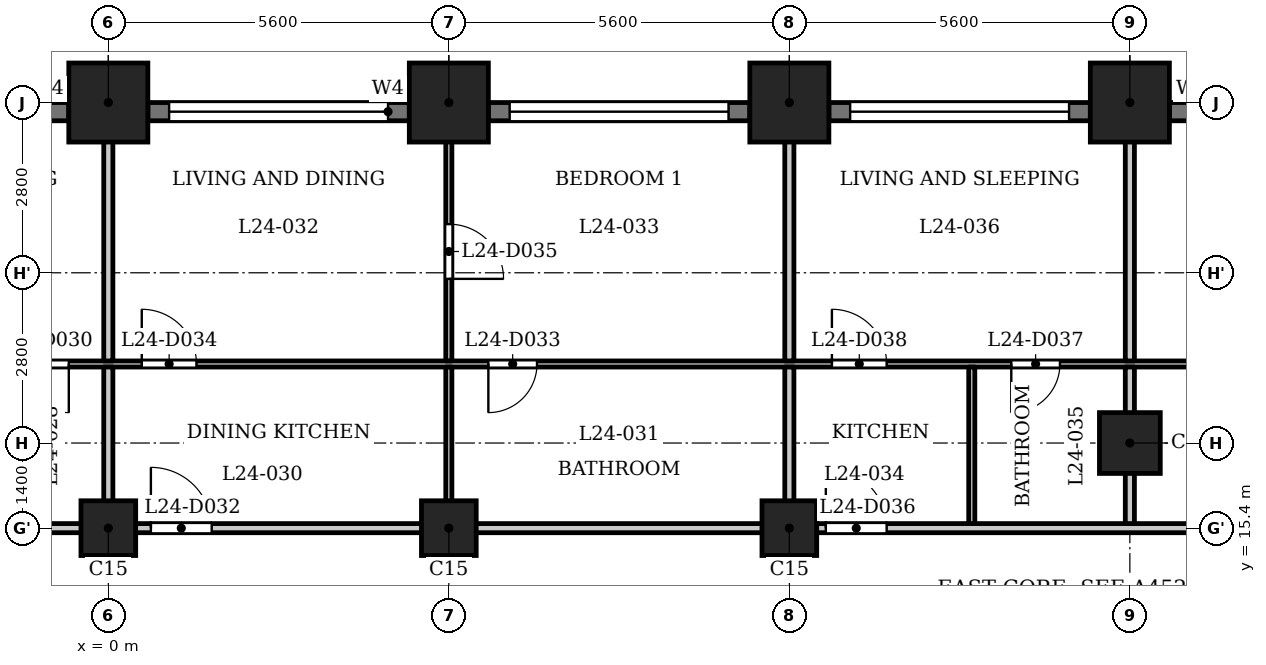
"""IFC4 building model, lengths in metres.
Left out: names, types, materials, properties, quantities, classifications, styles, units other than length and angle.
Written with IfcOpenShell. Run it as: python <this file> out.ifc"""

import sys

from ifc_helpers import new_model, si_unit, direction, frame, frame_2d, origin, origin_2d, place, context, subcontext, project, spatial, rectangle, extrude, element, fill, save


model = new_model("IFC4")
c1 = context("Model", 3, precision=1e-05, world=origin(), true_north=direction((0.0, 1.0)))
c2 = subcontext(c1, "Body", "Model", "MODEL_VIEW")
j1 = project(units=[si_unit("LENGTHUNIT", "METRE"), si_unit("PLANEANGLEUNIT", "RADIAN")], contexts=[c1])
p1 = place(None, origin())
s1 = spatial("IfcSite", under=j1, at=p1, CompositionType="ELEMENT")
p2 = place(p1, origin())
s2 = spatial("IfcBuilding", under=s1, at=p2, CompositionType="ELEMENT")
p3 = place(p2, frame((0.0, 0.0, 97.3)))
s3 = spatial("IfcBuildingStorey", under=s2, at=p3, CompositionType="ELEMENT", Elevation=97.3)
for number, where, z_axis, x_axis in (
    (1, (16.8, 22.4, 0.0), (0.0, 0.0, 1.0), (1.0, 0.0, 0.0)),
    (2, (11.2, 22.4, 0.0), (0.0, 0.0, 1.0), (1.0, 0.0, 0.0)),
    (3, (5.6, 22.4, 0.0), (0.0, 0.0, 1.0), (1.0, 0.0, 0.0)),
    (4, (0.0, 22.4, 0.0), (0.0, 0.0, 1.0), (1.0, 0.0, 0.0)),
):
    element("IfcColumn", number, at=place(p3, frame(where, z_axis=z_axis, x_axis=x_axis)), inside=s3, PredefinedType="COLUMN", context=c2, shape_type="SweptSolid", body=[
        extrude(rectangle(XDim=1.3, YDim=1.3, at=origin_2d()), origin(), (0.0, 0.0, 1.0), 3.5),
    ])
p4 = place(p3, frame((16.8, 16.8, 0.0), z_axis=(0.0, 0.0, 1.0), x_axis=(1.0, 0.0, 0.0)))
e5 = element("IfcColumn", 5, at=p4, inside=s3, PredefinedType="COLUMN", context=c2, shape_type="SweptSolid", body=[
    extrude(rectangle(XDim=1.0, YDim=1.0, at=origin_2d()), origin(), (0.0, 0.0, 1.0), 3.5),
])
for number, where, z_axis, x_axis in (
    (6, (0.0, 15.4, 0.0), (0.0, 0.0, 1.0), (1.0, 0.0, 0.0)),
    (7, (5.6, 15.4, 0.0), (0.0, 0.0, 1.0), (1.0, 0.0, 0.0)),
    (8, (11.2, 15.4, 0.0), (0.0, 0.0, 1.0), (1.0, 0.0, 0.0)),
):
    element("IfcColumn", number, at=place(p3, frame(where, z_axis=z_axis, x_axis=x_axis)), inside=s3, PredefinedType="COLUMN", context=c2, shape_type="SweptSolid", body=[
        extrude(rectangle(XDim=0.9, YDim=0.9, at=origin_2d()), origin(), (0.0, 0.0, 1.0), 3.5),
    ])
p5 = place(p3, frame((20.0, 22.25, 0.0), z_axis=(0.0, 0.0, 1.0), x_axis=(-1.0, 0.0, 0.0)))
e9 = element("IfcWall", 9, at=p5, inside=s3, PredefinedType="SOLIDWALL", context=c2, shape_type="SweptSolid", body=[
    extrude(rectangle(XDim=2.55, YDim=0.3, at=frame_2d((1.275, 0.0))), origin(), (0.0, 0.0, 1.0), 2.4),
])
p6 = place(p5, frame((0.375, 0.0, 0.9)))
e10 = element("IfcOpeningElement", 10, at=p6, cuts=e9, PredefinedType="OPENING", context=c2, shape_type="SweptSolid", body=[
    extrude(rectangle(XDim=1.8, YDim=1.25, at=frame_2d((0.9, 0.625))), frame((0.0, 0.16, 0.0), z_axis=(0.0, -1.0, 0.0), x_axis=(1.0, 0.0, 0.0)), (0.0, 0.0, 1.0), 0.32),
])
p7 = place(p3, frame((16.15, 22.25, 0.0), z_axis=(0.0, 0.0, 1.0), x_axis=(-1.0, 0.0, 0.0)))
e11 = element("IfcWall", 11, at=p7, inside=s3, PredefinedType="SOLIDWALL", context=c2, shape_type="SweptSolid", body=[
    extrude(rectangle(XDim=4.3, YDim=0.3, at=frame_2d((2.15, 0.0))), origin(), (0.0, 0.0, 1.0), 2.4),
])
p8 = place(p7, frame((0.35, 0.0, 1.2)))
e12 = element("IfcOpeningElement", 12, at=p8, cuts=e11, PredefinedType="OPENING", context=c2, shape_type="SweptSolid", body=[
    extrude(rectangle(XDim=3.6, YDim=0.95, at=frame_2d((1.8, 0.475))), frame((0.0, 0.16, 0.0), z_axis=(0.0, -1.0, 0.0), x_axis=(1.0, 0.0, 0.0)), (0.0, 0.0, 1.0), 0.32),
])
p9 = place(p3, frame((10.55, 22.25, 0.0), z_axis=(0.0, 0.0, 1.0), x_axis=(-1.0, 0.0, 0.0)))
e13 = element("IfcWall", 13, at=p9, inside=s3, PredefinedType="SOLIDWALL", context=c2, shape_type="SweptSolid", body=[
    extrude(rectangle(XDim=4.3, YDim=0.3, at=frame_2d((2.15, 0.0))), origin(), (0.0, 0.0, 1.0), 2.4),
])
p10 = place(p9, frame((0.35, 0.0, 1.2)))
e14 = element("IfcOpeningElement", 14, at=p10, cuts=e13, PredefinedType="OPENING", context=c2, shape_type="SweptSolid", body=[
    extrude(rectangle(XDim=3.6, YDim=0.95, at=frame_2d((1.8, 0.475))), frame((0.0, 0.16, 0.0), z_axis=(0.0, -1.0, 0.0), x_axis=(1.0, 0.0, 0.0)), (0.0, 0.0, 1.0), 0.32),
])
p11 = place(p3, frame((4.95, 22.25, 0.0), z_axis=(0.0, 0.0, 1.0), x_axis=(-1.0, 0.0, 0.0)))
e15 = element("IfcWall", 15, at=p11, inside=s3, PredefinedType="SOLIDWALL", context=c2, shape_type="SweptSolid", body=[
    extrude(rectangle(XDim=4.3, YDim=0.3, at=frame_2d((2.15, 0.0))), origin(), (0.0, 0.0, 1.0), 2.4),
])
p12 = place(p11, frame((0.35, 0.0, 1.2)))
e16 = element("IfcOpeningElement", 16, at=p12, cuts=e15, PredefinedType="OPENING", context=c2, shape_type="SweptSolid", body=[
    extrude(rectangle(XDim=3.6, YDim=0.95, at=frame_2d((1.8, 0.475))), frame((0.0, 0.16, 0.0), z_axis=(0.0, -1.0, 0.0), x_axis=(1.0, 0.0, 0.0)), (0.0, 0.0, 1.0), 0.32),
])
p13 = place(p3, frame((-0.65, 22.25, 0.0), z_axis=(0.0, 0.0, 1.0), x_axis=(-1.0, 0.0, 0.0)))
e17 = element("IfcWall", 17, at=p13, inside=s3, PredefinedType="SOLIDWALL", context=c2, shape_type="SweptSolid", body=[
    extrude(rectangle(XDim=4.3, YDim=0.3, at=frame_2d((2.15, 0.0))), origin(), (0.0, 0.0, 1.0), 2.4),
])
p14 = place(p13, frame((0.35, 0.0, 1.2)))
e18 = element("IfcOpeningElement", 18, at=p14, cuts=e17, PredefinedType="OPENING", context=c2, shape_type="SweptSolid", body=[
    extrude(rectangle(XDim=3.6, YDim=0.95, at=frame_2d((1.8, 0.475))), frame((0.0, 0.16, 0.0), z_axis=(0.0, -1.0, 0.0), x_axis=(1.0, 0.0, 0.0)), (0.0, 0.0, 1.0), 0.32),
])
p15 = place(p3, frame((-27.484, 15.4, 0.0), z_axis=(0.0, 0.0, 1.0), x_axis=(1.0, 0.0, 0.0)))
e19 = element("IfcWall", 19, at=p15, inside=s3, PredefinedType="PARTITIONING", context=c2, shape_type="SweptSolid", body=[
    extrude(rectangle(XDim=54.968, YDim=0.15, at=frame_2d((27.484, 0.0))), origin(), (0.0, 0.0, 1.0), 3.2),
])
p16 = place(p15, frame((9.034, 0.0, 0.0)))
e20 = element("IfcOpeningElement", 20, at=p16, cuts=e19, PredefinedType="OPENING", context=c2, shape_type="SweptSolid", body=[
    extrude(rectangle(XDim=1.0, YDim=2.1, at=frame_2d((0.5, 1.05))), frame((0.0, 0.085, 0.0), z_axis=(0.0, -1.0, 0.0), x_axis=(1.0, 0.0, 0.0)), (0.0, 0.0, 1.0), 0.17),
])
p17 = place(p15, frame((14.634, 0.0, 0.0)))
e21 = element("IfcOpeningElement", 21, at=p17, cuts=e19, PredefinedType="OPENING", context=c2, shape_type="SweptSolid", body=[
    extrude(rectangle(XDim=1.0, YDim=2.1, at=frame_2d((0.5, 1.05))), frame((0.0, 0.085, 0.0), z_axis=(0.0, -1.0, 0.0), x_axis=(1.0, 0.0, 0.0)), (0.0, 0.0, 1.0), 0.17),
])
p18 = place(p15, frame((19.984, 0.0, 0.0)))
e22 = element("IfcOpeningElement", 22, at=p18, cuts=e19, PredefinedType="OPENING", context=c2, shape_type="SweptSolid", body=[
    extrude(rectangle(XDim=1.0, YDim=2.1, at=frame_2d((0.5, 1.05))), frame((0.0, 0.085, 0.0), z_axis=(0.0, -1.0, 0.0), x_axis=(1.0, 0.0, 0.0)), (0.0, 0.0, 1.0), 0.17),
])
p19 = place(p15, frame((23.234, 0.0, 0.0)))
e23 = element("IfcOpeningElement", 23, at=p19, cuts=e19, PredefinedType="OPENING", context=c2, shape_type="SweptSolid", body=[
    extrude(rectangle(XDim=1.0, YDim=2.1, at=frame_2d((0.5, 1.05))), frame((0.0, 0.085, 0.0), z_axis=(0.0, -1.0, 0.0), x_axis=(1.0, 0.0, 0.0)), (0.0, 0.0, 1.0), 0.17),
])
p20 = place(p15, frame((28.184, 0.0, 0.0)))
e24 = element("IfcOpeningElement", 24, at=p20, cuts=e19, PredefinedType="OPENING", context=c2, shape_type="SweptSolid", body=[
    extrude(rectangle(XDim=1.0, YDim=2.1, at=frame_2d((0.5, 1.05))), frame((0.0, 0.085, 0.0), z_axis=(0.0, -1.0, 0.0), x_axis=(1.0, 0.0, 0.0)), (0.0, 0.0, 1.0), 0.17),
])
p21 = place(p15, frame((39.284, 0.0, 0.0)))
e25 = element("IfcOpeningElement", 25, at=p21, cuts=e19, PredefinedType="OPENING", context=c2, shape_type="SweptSolid", body=[
    extrude(rectangle(XDim=1.0, YDim=2.1, at=frame_2d((0.5, 1.05))), frame((0.0, 0.085, 0.0), z_axis=(0.0, -1.0, 0.0), x_axis=(1.0, 0.0, 0.0)), (0.0, 0.0, 1.0), 0.17),
])
p22 = place(p15, frame((48.234, 0.0, 0.0)))
e26 = element("IfcOpeningElement", 26, at=p22, cuts=e19, PredefinedType="OPENING", context=c2, shape_type="SweptSolid", body=[
    extrude(rectangle(XDim=1.0, YDim=2.1, at=frame_2d((0.5, 1.05))), frame((0.0, 0.085, 0.0), z_axis=(0.0, -1.0, 0.0), x_axis=(1.0, 0.0, 0.0)), (0.0, 0.0, 1.0), 0.17),
])
p23 = place(p3, frame((-26.44, 18.1, 0.0), z_axis=(0.0, 0.0, 1.0), x_axis=(1.0, 0.0, 0.0)))
e27 = element("IfcWall", 27, at=p23, inside=s3, PredefinedType="PARTITIONING", context=c2, shape_type="SweptSolid", body=[
    extrude(rectangle(XDim=52.63, YDim=0.1, at=frame_2d((26.315, 0.0))), origin(), (0.0, 0.0, 1.0), 3.2),
])
p24 = place(p23, frame((2.626, 0.0, 0.0)))
e28 = element("IfcOpeningElement", 28, at=p24, cuts=e27, PredefinedType="OPENING", context=c2, shape_type="SweptSolid", body=[
    extrude(rectangle(XDim=0.8, YDim=2.1, at=frame_2d((0.4, 1.05))), frame((0.0, 0.06, 0.0), z_axis=(0.0, -1.0, 0.0), x_axis=(1.0, 0.0, 0.0)), (0.0, 0.0, 1.0), 0.12),
])
p25 = place(p23, frame((8.09, 0.0, 0.0)))
e29 = element("IfcOpeningElement", 29, at=p25, cuts=e27, PredefinedType="OPENING", context=c2, shape_type="SweptSolid", body=[
    extrude(rectangle(XDim=0.9, YDim=2.1, at=frame_2d((0.45, 1.05))), frame((0.0, 0.06, 0.0), z_axis=(0.0, -1.0, 0.0), x_axis=(1.0, 0.0, 0.0)), (0.0, 0.0, 1.0), 0.12),
])
p26 = place(p23, frame((10.29, 0.0, 0.0)))
e30 = element("IfcOpeningElement", 30, at=p26, cuts=e27, PredefinedType="OPENING", context=c2, shape_type="SweptSolid", body=[
    extrude(rectangle(XDim=0.8, YDim=2.1, at=frame_2d((0.4, 1.05))), frame((0.0, 0.06, 0.0), z_axis=(0.0, -1.0, 0.0), x_axis=(1.0, 0.0, 0.0)), (0.0, 0.0, 1.0), 0.12),
])
p27 = place(p23, frame((13.69, 0.0, 0.0)))
e31 = element("IfcOpeningElement", 31, at=p27, cuts=e27, PredefinedType="OPENING", context=c2, shape_type="SweptSolid", body=[
    extrude(rectangle(XDim=0.9, YDim=2.1, at=frame_2d((0.45, 1.05))), frame((0.0, 0.06, 0.0), z_axis=(0.0, -1.0, 0.0), x_axis=(1.0, 0.0, 0.0)), (0.0, 0.0, 1.0), 0.12),
])
p28 = place(p23, frame((15.89, 0.0, 0.0)))
e32 = element("IfcOpeningElement", 32, at=p28, cuts=e27, PredefinedType="OPENING", context=c2, shape_type="SweptSolid", body=[
    extrude(rectangle(XDim=0.8, YDim=2.1, at=frame_2d((0.4, 1.05))), frame((0.0, 0.06, 0.0), z_axis=(0.0, -1.0, 0.0), x_axis=(1.0, 0.0, 0.0)), (0.0, 0.0, 1.0), 0.12),
])
p29 = place(p23, frame((19.04, 0.0, 0.0)))
e33 = element("IfcOpeningElement", 33, at=p29, cuts=e27, PredefinedType="OPENING", context=c2, shape_type="SweptSolid", body=[
    extrude(rectangle(XDim=0.9, YDim=2.1, at=frame_2d((0.45, 1.05))), frame((0.0, 0.06, 0.0), z_axis=(0.0, -1.0, 0.0), x_axis=(1.0, 0.0, 0.0)), (0.0, 0.0, 1.0), 0.12),
])
p30 = place(p23, frame((24.99, 0.0, 0.0)))
e34 = element("IfcOpeningElement", 34, at=p30, cuts=e27, PredefinedType="OPENING", context=c2, shape_type="SweptSolid", body=[
    extrude(rectangle(XDim=0.8, YDim=2.1, at=frame_2d((0.4, 1.05))), frame((0.0, 0.06, 0.0), z_axis=(0.0, -1.0, 0.0), x_axis=(1.0, 0.0, 0.0)), (0.0, 0.0, 1.0), 0.12),
])
p31 = place(p23, frame((22.29, 0.0, 0.0)))
e35 = element("IfcOpeningElement", 35, at=p31, cuts=e27, PredefinedType="OPENING", context=c2, shape_type="SweptSolid", body=[
    extrude(rectangle(XDim=0.9, YDim=2.1, at=frame_2d((0.45, 1.05))), frame((0.0, 0.06, 0.0), z_axis=(0.0, -1.0, 0.0), x_axis=(1.0, 0.0, 0.0)), (0.0, 0.0, 1.0), 0.12),
])
p32 = place(p23, frame((32.69, 0.0, 0.0)))
e36 = element("IfcOpeningElement", 36, at=p32, cuts=e27, PredefinedType="OPENING", context=c2, shape_type="SweptSolid", body=[
    extrude(rectangle(XDim=0.8, YDim=2.1, at=frame_2d((0.4, 1.05))), frame((0.0, 0.06, 0.0), z_axis=(0.0, -1.0, 0.0), x_axis=(1.0, 0.0, 0.0)), (0.0, 0.0, 1.0), 0.12),
])
p33 = place(p23, frame((26.99, 0.0, 0.0)))
e37 = element("IfcOpeningElement", 37, at=p33, cuts=e27, PredefinedType="OPENING", context=c2, shape_type="SweptSolid", body=[
    extrude(rectangle(XDim=0.9, YDim=2.1, at=frame_2d((0.45, 1.05))), frame((0.0, 0.06, 0.0), z_axis=(0.0, -1.0, 0.0), x_axis=(1.0, 0.0, 0.0)), (0.0, 0.0, 1.0), 0.12),
])
p34 = place(p23, frame((41.29, 0.0, 0.0)))
e38 = element("IfcOpeningElement", 38, at=p34, cuts=e27, PredefinedType="OPENING", context=c2, shape_type="SweptSolid", body=[
    extrude(rectangle(XDim=0.8, YDim=2.1, at=frame_2d((0.4, 1.05))), frame((0.0, 0.06, 0.0), z_axis=(0.0, -1.0, 0.0), x_axis=(1.0, 0.0, 0.0)), (0.0, 0.0, 1.0), 0.12),
])
p35 = place(p23, frame((38.34, 0.0, 0.0)))
e39 = element("IfcOpeningElement", 39, at=p35, cuts=e27, PredefinedType="OPENING", context=c2, shape_type="SweptSolid", body=[
    extrude(rectangle(XDim=0.9, YDim=2.1, at=frame_2d((0.45, 1.05))), frame((0.0, 0.06, 0.0), z_axis=(0.0, -1.0, 0.0), x_axis=(1.0, 0.0, 0.0)), (0.0, 0.0, 1.0), 0.12),
])
p36 = place(p23, frame((50.74, 0.0, 0.0)))
e40 = element("IfcOpeningElement", 40, at=p36, cuts=e27, PredefinedType="OPENING", context=c2, shape_type="SweptSolid", body=[
    extrude(rectangle(XDim=0.8, YDim=2.1, at=frame_2d((0.4, 1.05))), frame((0.0, 0.06, 0.0), z_axis=(0.0, -1.0, 0.0), x_axis=(1.0, 0.0, 0.0)), (0.0, 0.0, 1.0), 0.12),
])
p37 = place(p23, frame((47.29, 0.0, 0.0)))
e41 = element("IfcOpeningElement", 41, at=p37, cuts=e27, PredefinedType="OPENING", context=c2, shape_type="SweptSolid", body=[
    extrude(rectangle(XDim=0.9, YDim=2.1, at=frame_2d((0.45, 1.05))), frame((0.0, 0.06, 0.0), z_axis=(0.0, -1.0, 0.0), x_axis=(1.0, 0.0, 0.0)), (0.0, 0.0, 1.0), 0.12),
])
p38 = place(p3, frame((0.0, 15.475, 0.0), z_axis=(0.0, 0.0, 1.0), x_axis=(0.0, 1.0, 0.0)))
e42 = element("IfcWall", 42, at=p38, inside=s3, PredefinedType="PARTITIONING", context=c2, shape_type="SweptSolid", body=[
    extrude(rectangle(XDim=2.575, YDim=0.15, at=frame_2d((1.288, 0.0))), origin(), (0.0, 0.0, 1.0), 3.2),
])
p39 = place(p3, frame((0.0, 18.15, 0.0), z_axis=(0.0, 0.0, 1.0), x_axis=(0.0, 1.0, 0.0)))
e43 = element("IfcWall", 43, at=p39, inside=s3, PredefinedType="PARTITIONING", context=c2, shape_type="SweptSolid", body=[
    extrude(rectangle(XDim=4.88, YDim=0.15, at=frame_2d((2.44, 0.0))), origin(), (0.0, 0.0, 1.0), 3.2),
])
p40 = place(p3, frame((5.6, 15.475, 0.0), z_axis=(0.0, 0.0, 1.0), x_axis=(0.0, 1.0, 0.0)))
e44 = element("IfcWall", 44, at=p40, inside=s3, PredefinedType="PARTITIONING", context=c2, shape_type="SweptSolid", body=[
    extrude(rectangle(XDim=2.575, YDim=0.1, at=frame_2d((1.288, 0.0))), origin(), (0.0, 0.0, 1.0), 3.2),
])
p41 = place(p3, frame((5.6, 18.15, 0.0), z_axis=(0.0, 0.0, 1.0), x_axis=(0.0, 1.0, 0.0)))
e45 = element("IfcWall", 45, at=p41, inside=s3, PredefinedType="PARTITIONING", context=c2, shape_type="SweptSolid", body=[
    extrude(rectangle(XDim=4.88, YDim=0.1, at=frame_2d((2.44, 0.0))), origin(), (0.0, 0.0, 1.0), 3.2),
])
p42 = place(p41, frame((1.35, 0.0, 0.0)))
e46 = element("IfcOpeningElement", 46, at=p42, cuts=e45, PredefinedType="OPENING", context=c2, shape_type="SweptSolid", body=[
    extrude(rectangle(XDim=0.9, YDim=2.1, at=frame_2d((0.45, 1.05))), frame((0.0, 0.06, 0.0), z_axis=(0.0, -1.0, 0.0), x_axis=(1.0, 0.0, 0.0)), (0.0, 0.0, 1.0), 0.12),
])
p43 = place(p3, frame((11.2, 15.475, 0.0), z_axis=(0.0, 0.0, 1.0), x_axis=(0.0, 1.0, 0.0)))
e47 = element("IfcWall", 47, at=p43, inside=s3, PredefinedType="PARTITIONING", context=c2, shape_type="SweptSolid", body=[
    extrude(rectangle(XDim=2.575, YDim=0.15, at=frame_2d((1.288, 0.0))), origin(), (0.0, 0.0, 1.0), 3.2),
])
p44 = place(p3, frame((11.2, 18.15, 0.0), z_axis=(0.0, 0.0, 1.0), x_axis=(0.0, 1.0, 0.0)))
e48 = element("IfcWall", 48, at=p44, inside=s3, PredefinedType="PARTITIONING", context=c2, shape_type="SweptSolid", body=[
    extrude(rectangle(XDim=4.88, YDim=0.15, at=frame_2d((2.44, 0.0))), origin(), (0.0, 0.0, 1.0), 3.2),
])
p45 = place(p3, frame((14.2, 15.475, 0.0), z_axis=(0.0, 0.0, 1.0), x_axis=(0.0, 1.0, 0.0)))
e49 = element("IfcWall", 49, at=p45, inside=s3, PredefinedType="PARTITIONING", context=c2, shape_type="SweptSolid", body=[
    extrude(rectangle(XDim=2.575, YDim=0.1, at=frame_2d((1.288, 0.0))), origin(), (0.0, 0.0, 1.0), 3.2),
])
p46 = place(p3, frame((16.8, 15.475, 0.0), z_axis=(0.0, 0.0, 1.0), x_axis=(0.0, 1.0, 0.0)))
e50 = element("IfcWall", 50, at=p46, inside=s3, PredefinedType="PARTITIONING", context=c2, shape_type="SweptSolid", body=[
    extrude(rectangle(XDim=2.575, YDim=0.15, at=frame_2d((1.288, 0.0))), origin(), (0.0, 0.0, 1.0), 3.2),
])
p47 = place(p3, frame((16.8, 18.15, 0.0), z_axis=(0.0, 0.0, 1.0), x_axis=(0.0, 1.0, 0.0)))
e51 = element("IfcWall", 51, at=p47, inside=s3, PredefinedType="PARTITIONING", context=c2, shape_type="SweptSolid", body=[
    extrude(rectangle(XDim=4.88, YDim=0.15, at=frame_2d((2.44, 0.0))), origin(), (0.0, 0.0, 1.0), 3.2),
])
p48 = place(p30, origin())
e52 = element("IfcDoor", 52, at=p48, inside=s3, OperationType="SINGLE_SWING_RIGHT", PredefinedType="DOOR", context=c2, shape_type="SweptSolid", body=[
    extrude(rectangle(XDim=0.8, YDim=2.1, at=frame_2d((0.4, 1.05))), frame((0.0, 0.025, 0.0), z_axis=(0.0, -1.0, 0.0), x_axis=(1.0, 0.0, 0.0)), (0.0, 0.0, 1.0), 0.05),
])
fill(e34, e52)
p49 = place(p20, origin())
e53 = element("IfcDoor", 53, at=p49, inside=s3, OperationType="SINGLE_SWING_RIGHT", PredefinedType="DOOR", context=c2, shape_type="SweptSolid", body=[
    extrude(rectangle(XDim=1.0, YDim=2.1, at=frame_2d((0.5, 1.05))), frame((0.0, 0.025, 0.0), z_axis=(0.0, -1.0, 0.0), x_axis=(1.0, 0.0, 0.0)), (0.0, 0.0, 1.0), 0.05),
])
fill(e24, e53)
p50 = place(p32, origin())
e54 = element("IfcDoor", 54, at=p50, inside=s3, OperationType="SINGLE_SWING_LEFT", PredefinedType="DOOR", context=c2, shape_type="SweptSolid", body=[
    extrude(rectangle(XDim=0.8, YDim=2.1, at=frame_2d((0.4, 1.05))), frame((0.0, 0.025, 0.0), z_axis=(0.0, -1.0, 0.0), x_axis=(1.0, 0.0, 0.0)), (0.0, 0.0, 1.0), 0.05),
])
fill(e36, e54)
p51 = place(p33, origin())
e55 = element("IfcDoor", 55, at=p51, inside=s3, OperationType="SINGLE_SWING_RIGHT", PredefinedType="DOOR", context=c2, shape_type="SweptSolid", body=[
    extrude(rectangle(XDim=0.9, YDim=2.1, at=frame_2d((0.45, 1.05))), frame((0.0, 0.025, 0.0), z_axis=(0.0, -1.0, 0.0), x_axis=(1.0, 0.0, 0.0)), (0.0, 0.0, 1.0), 0.05),
])
fill(e37, e55)
p52 = place(p42, origin())
e56 = element("IfcDoor", 56, at=p52, inside=s3, OperationType="SINGLE_SWING_LEFT", PredefinedType="DOOR", context=c2, shape_type="SweptSolid", body=[
    extrude(rectangle(XDim=0.9, YDim=2.1, at=frame_2d((0.45, 1.05))), frame((0.0, 0.025, 0.0), z_axis=(0.0, -1.0, 0.0), x_axis=(1.0, 0.0, 0.0)), (0.0, 0.0, 1.0), 0.05),
])
fill(e46, e56)
p53 = place(p21, origin())
e57 = element("IfcDoor", 57, at=p53, inside=s3, OperationType="SINGLE_SWING_RIGHT", PredefinedType="DOOR", context=c2, shape_type="SweptSolid", body=[
    extrude(rectangle(XDim=1.0, YDim=2.1, at=frame_2d((0.5, 1.05))), frame((0.0, 0.025, 0.0), z_axis=(0.0, -1.0, 0.0), x_axis=(1.0, 0.0, 0.0)), (0.0, 0.0, 1.0), 0.05),
])
fill(e25, e57)
p54 = place(p34, origin())
e58 = element("IfcDoor", 58, at=p54, inside=s3, OperationType="SINGLE_SWING_LEFT", PredefinedType="DOOR", context=c2, shape_type="SweptSolid", body=[
    extrude(rectangle(XDim=0.8, YDim=2.1, at=frame_2d((0.4, 1.05))), frame((0.0, 0.025, 0.0), z_axis=(0.0, -1.0, 0.0), x_axis=(1.0, 0.0, 0.0)), (0.0, 0.0, 1.0), 0.05),
])
fill(e38, e58)
p55 = place(p35, origin())
e59 = element("IfcDoor", 59, at=p55, inside=s3, OperationType="SINGLE_SWING_RIGHT", PredefinedType="DOOR", context=c2, shape_type="SweptSolid", body=[
    extrude(rectangle(XDim=0.9, YDim=2.1, at=frame_2d((0.45, 1.05))), frame((0.0, 0.025, 0.0), z_axis=(0.0, -1.0, 0.0), x_axis=(1.0, 0.0, 0.0)), (0.0, 0.0, 1.0), 0.05),
])
fill(e39, e59)
p56 = place(p8, origin())
e60 = element("IfcWindow", 60, at=p56, inside=s3, PartitioningType="SINGLE_PANEL", PredefinedType="WINDOW", context=c2, shape_type="SweptSolid", body=[
    extrude(rectangle(XDim=3.6, YDim=0.95, at=frame_2d((1.8, 0.475))), frame((0.0, 0.03, 0.0), z_axis=(0.0, -1.0, 0.0), x_axis=(1.0, 0.0, 0.0)), (0.0, 0.0, 1.0), 0.06),
])
fill(e12, e60)
p57 = place(p10, origin())
e61 = element("IfcWindow", 61, at=p57, inside=s3, PartitioningType="SINGLE_PANEL", PredefinedType="WINDOW", context=c2, shape_type="SweptSolid", body=[
    extrude(rectangle(XDim=3.6, YDim=0.95, at=frame_2d((1.8, 0.475))), frame((0.0, 0.03, 0.0), z_axis=(0.0, -1.0, 0.0), x_axis=(1.0, 0.0, 0.0)), (0.0, 0.0, 1.0), 0.06),
])
fill(e14, e61)
p58 = place(p12, origin())
e62 = element("IfcWindow", 62, at=p58, inside=s3, PartitioningType="SINGLE_PANEL", PredefinedType="WINDOW", context=c2, shape_type="SweptSolid", body=[
    extrude(rectangle(XDim=3.6, YDim=0.95, at=frame_2d((1.8, 0.475))), frame((0.0, 0.03, 0.0), z_axis=(0.0, -1.0, 0.0), x_axis=(1.0, 0.0, 0.0)), (0.0, 0.0, 1.0), 0.06),
])
fill(e16, e62)
save(model, sys.argv[1])
